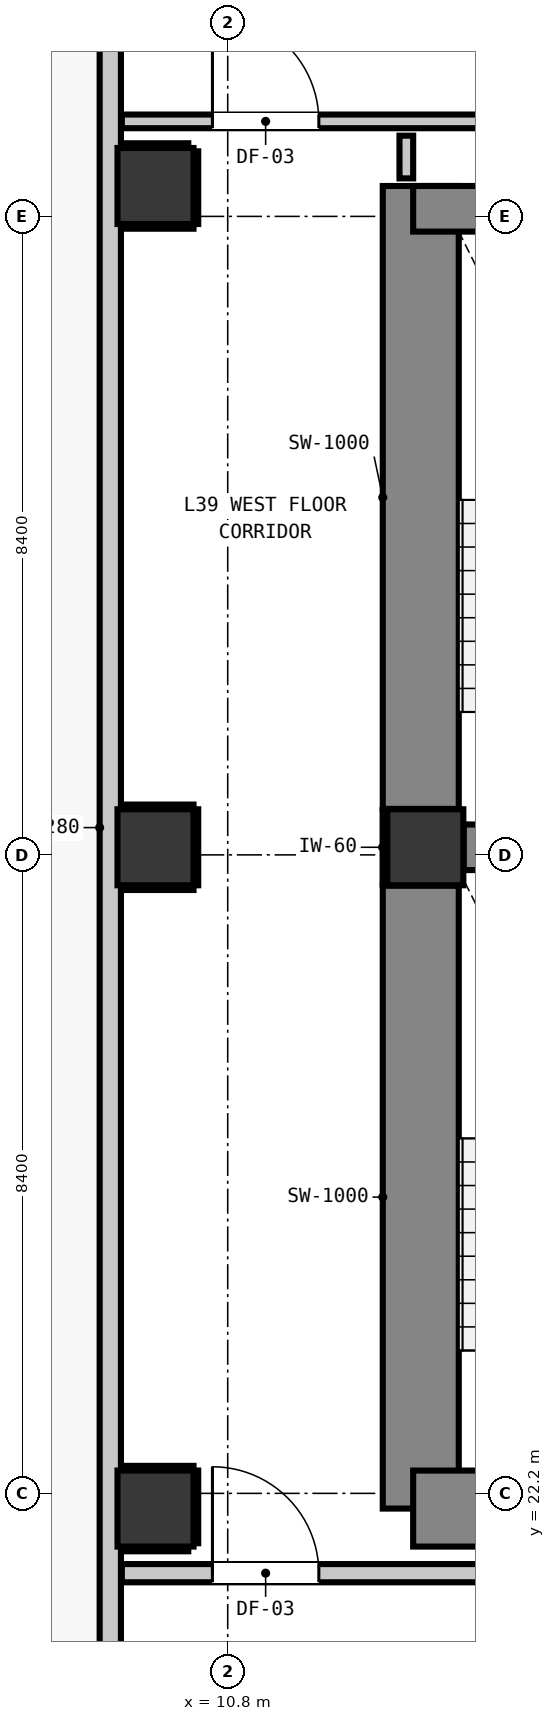
"""IFC4 building model, lengths in metres.
Left out: names, types, materials, properties, quantities, classifications, styles, units other than length and angle.
Written with IfcOpenShell. Run it as: python <this file> out.ifc"""

import sys

from ifc_helpers import new_model, si_unit, direction, frame, frame_2d, origin, origin_2d, place, context, subcontext, project, spatial, rectangle, extrude, element, fill, save


model = new_model("IFC4")
c1 = context("Model", 3, precision=1e-05, world=origin(), true_north=direction((0.0, 1.0)))
c2 = subcontext(c1, "Body", "Model", "MODEL_VIEW")
j1 = project(units=[si_unit("LENGTHUNIT", "METRE"), si_unit("PLANEANGLEUNIT", "RADIAN")], contexts=[c1])
p1 = place(None, origin())
s1 = spatial("IfcSite", under=j1, at=p1, CompositionType="ELEMENT")
p2 = place(p1, origin())
s2 = spatial("IfcBuilding", under=s1, at=p2, CompositionType="ELEMENT")
p3 = place(p2, frame((0.0, 0.0, 135.96)))
s3 = spatial("IfcBuildingStorey", under=s2, at=p3, CompositionType="ELEMENT", Elevation=135.96)
p4 = place(p3, frame((13.4, 30.7, 0.0), z_axis=(0.0, 0.0, 1.0), x_axis=(1.0, 0.0, 0.0)))
e1 = element("IfcColumn", 1, at=p4, inside=s3, PredefinedType="COLUMN", context=c2, shape_type="SweptSolid", body=[
    extrude(rectangle(XDim=1.0, YDim=1.0, at=origin_2d()), origin(), (0.0, 0.0, 1.0), 3.32),
])
p5 = place(p3, frame((13.34, 22.0, 0.0), z_axis=(0.0, 0.0, 1.0), x_axis=(0.0, 1.0, 0.0)))
e2 = element("IfcWall", 2, at=p5, inside=s3, PredefinedType="SHEAR", context=c2, shape_type="SweptSolid", body=[
    extrude(rectangle(XDim=8.195, YDim=1.0, at=frame_2d((4.098, 0.0))), origin(), (0.0, 0.0, 1.0), 3.32),
])
p6 = place(p3, frame((13.34, 31.205, 0.0), z_axis=(0.0, 0.0, 1.0), x_axis=(0.0, 1.0, 0.0)))
e3 = element("IfcWall", 3, at=p6, inside=s3, PredefinedType="SHEAR", context=c2, shape_type="SweptSolid", body=[
    extrude(rectangle(XDim=8.195, YDim=1.0, at=frame_2d((4.097, 0.0))), origin(), (0.0, 0.0, 1.0), 3.32),
])
p7 = place(p3, frame((13.24, 22.0, 0.0), z_axis=(0.0, 0.0, 1.0), x_axis=(1.0, 0.0, 0.0)))
e4 = element("IfcWall", 4, at=p7, inside=s3, PredefinedType="SHEAR", context=c2, shape_type="SweptSolid", body=[
    extrude(rectangle(XDim=4.08, YDim=1.0, at=frame_2d((2.04, 0.0))), origin(), (0.0, 0.0, 1.0), 3.32),
])
p8 = place(p3, frame((13.24, 39.1, 0.0), z_axis=(0.0, 0.0, 1.0), x_axis=(1.0, 0.0, 0.0)))
e5 = element("IfcWall", 5, at=p8, inside=s3, PredefinedType="SHEAR", context=c2, shape_type="SweptSolid", body=[
    extrude(rectangle(XDim=4.08, YDim=0.6, at=frame_2d((2.04, 0.0))), origin(), (0.0, 0.0, 1.0), 3.32),
])
p9 = place(p3, frame((13.905, 30.7, 0.0), z_axis=(0.0, 0.0, 1.0), x_axis=(1.0, 0.0, 0.0)))
e6 = element("IfcWall", 6, at=p9, inside=s3, PredefinedType="SHEAR", context=c2, shape_type="SweptSolid", body=[
    extrude(rectangle(XDim=3.415, YDim=0.6, at=frame_2d((1.708, 0.0))), origin(), (0.0, 0.0, 1.0), 3.32),
])
for number, where, z_axis, x_axis in (
    (7, (9.85, 22.0, 0.0), (0.0, 0.0, 1.0), (1.0, 0.0, 0.0)),
    (8, (9.85, 30.7, 0.0), (0.0, 0.0, 1.0), (1.0, 0.0, 0.0)),
    (9, (9.85, 39.4, 0.0), (0.0, 0.0, 1.0), (1.0, 0.0, 0.0)),
):
    element("IfcColumn", number, at=place(p3, frame(where, z_axis=z_axis, x_axis=x_axis)), inside=s3, PredefinedType="COLUMN", context=c2, shape_type="SweptSolid", body=[
        extrude(rectangle(XDim=1.0, YDim=1.0, at=origin_2d()), origin(), (0.0, 0.0, 1.0), 3.32),
    ])
p10 = place(p3, frame((9.255, 11.355, 0.0), z_axis=(0.0, 0.0, 1.0), x_axis=(0.0, 1.0, 0.0)))
e10 = element("IfcWall", 10, at=p10, inside=s3, PredefinedType="STANDARD", context=c2, shape_type="SweptSolid", body=[
    extrude(rectangle(XDim=32.29, YDim=0.28, at=frame_2d((16.145, 0.0))), origin(), (0.0, 0.0, 1.0), 3.08),
])
p11 = place(p10, frame((5.818, 0.0, 0.0)))
e11 = element("IfcOpeningElement", 11, at=p11, cuts=e10, PredefinedType="OPENING", context=c2, shape_type="SweptSolid", body=[
    extrude(rectangle(XDim=1.0, YDim=2.15, at=frame_2d((0.5, 1.075))), frame((0.0, 0.15, 0.0), z_axis=(0.0, -1.0, 0.0), x_axis=(1.0, 0.0, 0.0)), (0.0, 0.0, 1.0), 0.3),
])
p12 = place(p10, frame((0.544, 0.0, 0.85)))
e12 = element("IfcOpeningElement", 12, at=p12, cuts=e10, PredefinedType="OPENING", context=c2, shape_type="SweptSolid", body=[
    extrude(rectangle(XDim=1.05, YDim=1.65, at=frame_2d((0.525, 0.825))), frame((0.0, 0.15, 0.0), z_axis=(0.0, -1.0, 0.0), x_axis=(1.0, 0.0, 0.0)), (0.0, 0.0, 1.0), 0.3),
])
p13 = place(p3, frame((9.407, 21.15, 0.0), z_axis=(0.0, 0.0, 1.0), x_axis=(1.0, 0.0, 0.0)))
e13 = element("IfcWall", 13, at=p13, inside=s3, PredefinedType="PARTITIONING", context=c2, shape_type="SweptSolid", body=[
    extrude(rectangle(XDim=39.386, YDim=0.24, at=frame_2d((19.693, 0.0))), origin(), (0.0, 0.0, 1.0), 3.08),
])
p14 = place(p13, frame((8.803, 0.0, 0.0)))
e14 = element("IfcOpeningElement", 14, at=p14, cuts=e13, PredefinedType="OPENING", context=c2, shape_type="SweptSolid", body=[
    extrude(rectangle(XDim=1.1, YDim=2.15, at=frame_2d((0.55, 1.075))), frame((0.0, 0.13, 0.0), z_axis=(0.0, -1.0, 0.0), x_axis=(1.0, 0.0, 0.0)), (0.0, 0.0, 1.0), 0.26),
])
p15 = place(p13, frame((1.192, 0.0, 0.0)))
e15 = element("IfcOpeningElement", 15, at=p15, cuts=e13, PredefinedType="OPENING", context=c2, shape_type="SweptSolid", body=[
    extrude(rectangle(XDim=1.4, YDim=2.15, at=frame_2d((0.7, 1.075))), frame((0.0, 0.13, 0.0), z_axis=(0.0, -1.0, 0.0), x_axis=(1.0, 0.0, 0.0)), (0.0, 0.0, 1.0), 0.26),
])
p16 = place(p13, frame((28.643, 0.0, 0.0)))
e16 = element("IfcOpeningElement", 16, at=p16, cuts=e13, PredefinedType="OPENING", context=c2, shape_type="SweptSolid", body=[
    extrude(rectangle(XDim=1.4, YDim=2.15, at=frame_2d((0.7, 1.075))), frame((0.0, 0.13, 0.0), z_axis=(0.0, -1.0, 0.0), x_axis=(1.0, 0.0, 0.0)), (0.0, 0.0, 1.0), 0.26),
])
p17 = place(p3, frame((9.407, 40.25, 0.0), z_axis=(0.0, 0.0, 1.0), x_axis=(1.0, 0.0, 0.0)))
e17 = element("IfcWall", 17, at=p17, inside=s3, PredefinedType="PARTITIONING", context=c2, shape_type="SweptSolid", body=[
    extrude(rectangle(XDim=27.536, YDim=0.18, at=frame_2d((13.768, 0.0))), origin(), (0.0, 0.0, 1.0), 3.08),
])
p18 = place(p17, frame((8.028, 0.0, 0.0)))
e18 = element("IfcOpeningElement", 18, at=p18, cuts=e17, PredefinedType="OPENING", context=c2, shape_type="SweptSolid", body=[
    extrude(rectangle(XDim=1.4, YDim=2.15, at=frame_2d((0.7, 1.075))), frame((0.0, 0.1, 0.0), z_axis=(0.0, -1.0, 0.0), x_axis=(1.0, 0.0, 0.0)), (0.0, 0.0, 1.0), 0.2),
])
p19 = place(p17, frame((1.192, 0.0, 0.0)))
e19 = element("IfcOpeningElement", 19, at=p19, cuts=e17, PredefinedType="OPENING", context=c2, shape_type="SweptSolid", body=[
    extrude(rectangle(XDim=1.4, YDim=2.15, at=frame_2d((0.7, 1.075))), frame((0.0, 0.1, 0.0), z_axis=(0.0, -1.0, 0.0), x_axis=(1.0, 0.0, 0.0)), (0.0, 0.0, 1.0), 0.2),
])
p20 = place(p3, frame((13.15, 39.5, 0.0), z_axis=(0.0, 0.0, 1.0), x_axis=(0.0, 1.0, 0.0)))
e20 = element("IfcWall", 20, at=p20, inside=s3, PredefinedType="PARTITIONING", context=c2, shape_type="SweptSolid", body=[
    extrude(rectangle(XDim=0.562, YDim=0.18, at=frame_2d((0.281, 0.0))), origin(), (0.0, 0.0, 1.0), 2.315),
])
p21 = place(p3, frame((12.868, 30.21, 0.0), z_axis=(0.0, 0.0, 1.0), x_axis=(0.0, 1.0, 0.0)))
e21 = element("IfcWall", 21, at=p21, inside=s3, PredefinedType="PARTITIONING", context=c2, shape_type="SweptSolid", body=[
    extrude(rectangle(XDim=0.98, YDim=0.06, at=frame_2d((0.49, 0.0))), origin(), (0.0, 0.0, 1.0), 1.45),
])
p22 = place(p3, frame((9.41, 21.468, 0.0), z_axis=(0.0, 0.0, 1.0), x_axis=(1.0, 0.0, 0.0)))
e22 = element("IfcWall", 22, at=p22, inside=s3, PredefinedType="PARTITIONING", context=c2, shape_type="SweptSolid", body=[
    extrude(rectangle(XDim=0.871, YDim=0.06, at=frame_2d((0.436, 0.0))), origin(), (0.0, 0.0, 1.0), 1.45),
])
p23 = place(p3, frame((9.41, 22.532, 0.0), z_axis=(0.0, 0.0, 1.0), x_axis=(1.0, 0.0, 0.0)))
e23 = element("IfcWall", 23, at=p23, inside=s3, PredefinedType="PARTITIONING", context=c2, shape_type="SweptSolid", body=[
    extrude(rectangle(XDim=0.94, YDim=0.06, at=frame_2d((0.47, 0.0))), origin(), (0.0, 0.0, 1.0), 1.45),
])
p24 = place(p3, frame((10.382, 21.544, 0.0), z_axis=(0.0, 0.0, 1.0), x_axis=(0.0, 1.0, 0.0)))
e24 = element("IfcWall", 24, at=p24, inside=s3, PredefinedType="PARTITIONING", context=c2, shape_type="SweptSolid", body=[
    extrude(rectangle(XDim=0.956, YDim=0.06, at=frame_2d((0.478, 0.0))), origin(), (0.0, 0.0, 1.0), 1.45),
])
for number, where, z_axis, x_axis in (
    (25, (9.41, 30.168, 0.0), (0.0, 0.0, 1.0), (1.0, 0.0, 0.0)),
    (26, (9.41, 31.232, 0.0), (0.0, 0.0, 1.0), (1.0, 0.0, 0.0)),
):
    element("IfcWall", number, at=place(p3, frame(where, z_axis=z_axis, x_axis=x_axis)), inside=s3, PredefinedType="PARTITIONING", context=c2, shape_type="SweptSolid", body=[
        extrude(rectangle(XDim=0.94, YDim=0.06, at=frame_2d((0.47, 0.0))), origin(), (0.0, 0.0, 1.0), 1.45),
    ])
p25 = place(p3, frame((10.382, 30.2, 0.0), z_axis=(0.0, 0.0, 1.0), x_axis=(0.0, 1.0, 0.0)))
e27 = element("IfcWall", 27, at=p25, inside=s3, PredefinedType="PARTITIONING", context=c2, shape_type="SweptSolid", body=[
    extrude(rectangle(XDim=1.0, YDim=0.06, at=frame_2d((0.5, 0.0))), origin(), (0.0, 0.0, 1.0), 1.45),
])
p26 = place(p3, frame((9.41, 38.868, 0.0), z_axis=(0.0, 0.0, 1.0), x_axis=(1.0, 0.0, 0.0)))
e28 = element("IfcWall", 28, at=p26, inside=s3, PredefinedType="PARTITIONING", context=c2, shape_type="SweptSolid", body=[
    extrude(rectangle(XDim=0.94, YDim=0.06, at=frame_2d((0.47, 0.0))), origin(), (0.0, 0.0, 1.0), 1.45),
])
p27 = place(p3, frame((9.41, 39.932, 0.0), z_axis=(0.0, 0.0, 1.0), x_axis=(1.0, 0.0, 0.0)))
e29 = element("IfcWall", 29, at=p27, inside=s3, PredefinedType="PARTITIONING", context=c2, shape_type="SweptSolid", body=[
    extrude(rectangle(XDim=0.871, YDim=0.06, at=frame_2d((0.436, 0.0))), origin(), (0.0, 0.0, 1.0), 1.45),
])
p28 = place(p3, frame((10.382, 38.9, 0.0), z_axis=(0.0, 0.0, 1.0), x_axis=(0.0, 1.0, 0.0)))
e30 = element("IfcWall", 30, at=p28, inside=s3, PredefinedType="PARTITIONING", context=c2, shape_type="SweptSolid", body=[
    extrude(rectangle(XDim=0.956, YDim=0.06, at=frame_2d((0.478, 0.0))), origin(), (0.0, 0.0, 1.0), 1.45),
])
p29 = place(p15, origin())
e31 = element("IfcDoor", 31, at=p29, inside=s3, OperationType="SINGLE_SWING_LEFT", PredefinedType="DOOR", context=c2, shape_type="SweptSolid", body=[
    extrude(rectangle(XDim=1.4, YDim=2.15, at=frame_2d((0.7, 1.075))), frame((0.0, 0.025, 0.0), z_axis=(0.0, -1.0, 0.0), x_axis=(1.0, 0.0, 0.0)), (0.0, 0.0, 1.0), 0.05),
])
fill(e15, e31)
p30 = place(p19, origin())
e32 = element("IfcDoor", 32, at=p30, inside=s3, OperationType="SINGLE_SWING_LEFT", PredefinedType="DOOR", context=c2, shape_type="SweptSolid", body=[
    extrude(rectangle(XDim=1.4, YDim=2.15, at=frame_2d((0.7, 1.075))), frame((0.0, 0.025, 0.0), z_axis=(0.0, -1.0, 0.0), x_axis=(1.0, 0.0, 0.0)), (0.0, 0.0, 1.0), 0.05),
])
fill(e19, e32)
save(model, sys.argv[1])
